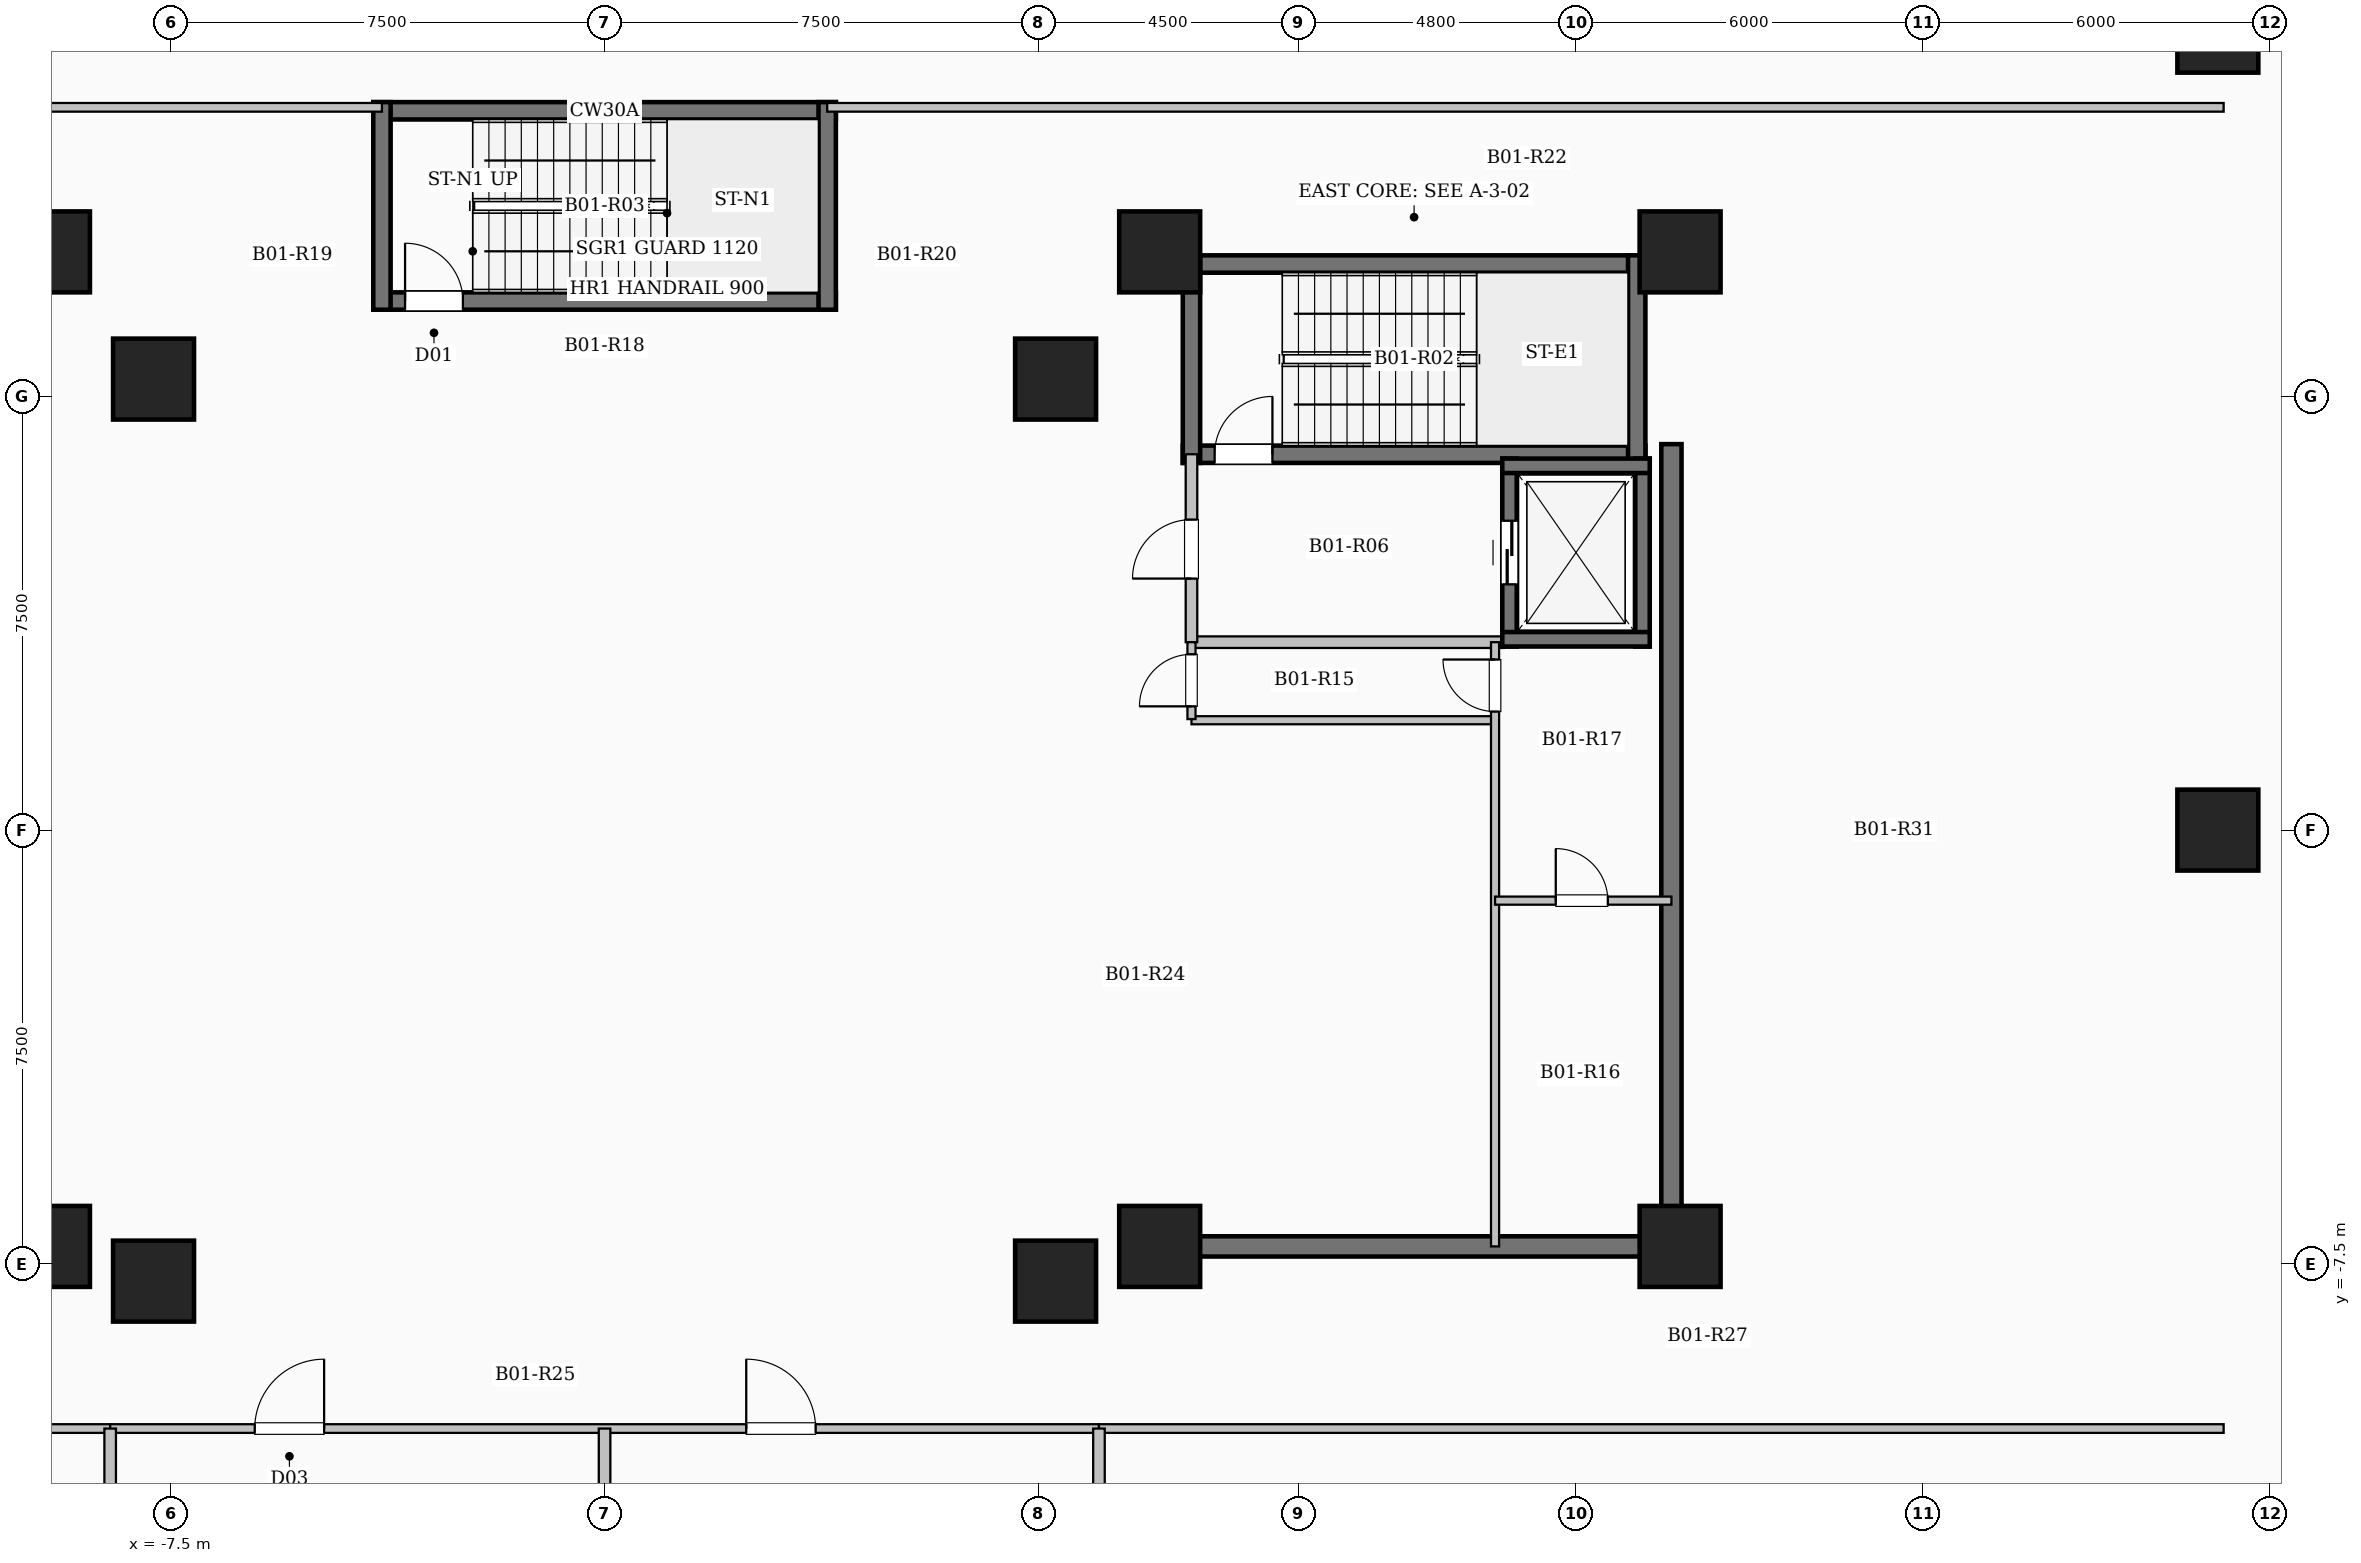
"""IFC4 building model, lengths in metres.
Left out: names, types, materials, properties, quantities, classifications, styles, units other than length and angle.
Written with IfcOpenShell. Run it as: python <this file> out.ifc"""

import sys

from ifc_helpers import new_model, si_unit, direction, frame, frame_2d, origin, origin_2d, place, context, subcontext, project, spatial, rectangle, extrude, element, fill, save


model = new_model("IFC4")
c1 = context("Model", 3, precision=1e-05, world=origin(), true_north=direction((0.0, 1.0)))
c2 = subcontext(c1, "Body", "Model", "MODEL_VIEW")
j1 = project(units=[si_unit("LENGTHUNIT", "METRE"), si_unit("PLANEANGLEUNIT", "RADIAN")], contexts=[c1])
p1 = place(None, origin())
s1 = spatial("IfcSite", under=j1, at=p1, CompositionType="ELEMENT")
p2 = place(p1, origin())
s2 = spatial("IfcBuilding", under=s1, at=p2, CompositionType="ELEMENT")
p3 = place(p2, frame((0.0, 0.0, -4.6)))
s3 = spatial("IfcBuildingStorey", under=s2, at=p3, CompositionType="ELEMENT", Elevation=-4.6)
for number, where, z_axis, x_axis in (
    (1, (-7.8, -7.8, 0.0), (0.0, 0.0, 1.0), (1.0, 0.0, 0.0)),
    (2, (7.8, -7.8, 0.0), (0.0, 0.0, 1.0), (1.0, 0.0, 0.0)),
    (3, (-7.8, 7.8, 0.0), (0.0, 0.0, 1.0), (1.0, 0.0, 0.0)),
    (4, (7.8, 7.8, 0.0), (0.0, 0.0, 1.0), (1.0, 0.0, 0.0)),
    (5, (-9.6, -7.2, 0.0), (0.0, 0.0, 1.0), (1.0, 0.0, 0.0)),
    (6, (-9.6, 10.0, 0.0), (0.0, 0.0, 1.0), (1.0, 0.0, 0.0)),
    (7, (9.6, -7.2, 0.0), (0.0, 0.0, 1.0), (1.0, 0.0, 0.0)),
    (8, (9.6, 10.0, 0.0), (0.0, 0.0, 1.0), (1.0, 0.0, 0.0)),
    (9, (18.6, -7.2, 0.0), (0.0, 0.0, 1.0), (1.0, 0.0, 0.0)),
    (10, (18.6, 10.0, 0.0), (0.0, 0.0, 1.0), (1.0, 0.0, 0.0)),
    (11, (27.9, 0.0, 0.0), (0.0, 0.0, 1.0), (1.0, 0.0, 0.0)),
    (12, (27.9, 13.8, 0.0), (0.0, 0.0, 1.0), (1.0, 0.0, 0.0)),
):
    element("IfcColumn", number, at=place(p3, frame(where, z_axis=z_axis, x_axis=x_axis)), inside=s3, PredefinedType="COLUMN", context=c2, shape_type="SweptSolid", body=[
        extrude(rectangle(XDim=1.4, YDim=1.4, at=origin_2d()), origin(), (0.0, 0.0, 1.0), 4.6),
    ])
p4 = place(p3, frame((10.0, 9.79, 0.0), z_axis=(0.0, 0.0, 1.0), x_axis=(1.0, 0.0, 0.0)))
e13 = element("IfcWall", 13, at=p4, inside=s3, PredefinedType="SHEAR", context=c2, shape_type="SweptSolid", body=[
    extrude(rectangle(XDim=8.0, YDim=0.3, at=frame_2d((4.0, 0.0))), origin(), (0.0, 0.0, 1.0), 4.6),
])
p5 = place(p3, frame((10.0, 6.5, 0.0), z_axis=(0.0, 0.0, 1.0), x_axis=(1.0, 0.0, 0.0)))
e14 = element("IfcWall", 14, at=p5, inside=s3, PredefinedType="SHEAR", context=c2, shape_type="SweptSolid", body=[
    extrude(rectangle(XDim=8.0, YDim=0.3, at=frame_2d((4.0, 0.0))), origin(), (0.0, 0.0, 1.0), 4.6),
])
p6 = place(p5, frame((0.55, 0.0, 0.0)))
e15 = element("IfcOpeningElement", 15, at=p6, cuts=e14, PredefinedType="OPENING", context=c2, shape_type="SweptSolid", body=[
    extrude(rectangle(XDim=1.0, YDim=2.15, at=frame_2d((0.5, 1.075))), frame((0.0, 0.16, 0.0), z_axis=(0.0, -1.0, 0.0), x_axis=(1.0, 0.0, 0.0)), (0.0, 0.0, 1.0), 0.32),
])
for number, where, z_axis, x_axis in (
    (16, (10.15, 6.35, 0.0), (0.0, 0.0, 1.0), (0.0, 1.0, 0.0)),
    (17, (17.85, 6.35, 0.0), (0.0, 0.0, 1.0), (0.0, 1.0, 0.0)),
):
    element("IfcWall", number, at=place(p3, frame(where, z_axis=z_axis, x_axis=x_axis)), inside=s3, PredefinedType="SHEAR", context=c2, shape_type="SweptSolid", body=[
        extrude(rectangle(XDim=3.59, YDim=0.3, at=frame_2d((1.795, 0.0))), origin(), (0.0, 0.0, 1.0), 4.6),
    ])
p7 = place(p3, frame((-4.0, 12.44, 0.0), z_axis=(0.0, 0.0, 1.0), x_axis=(1.0, 0.0, 0.0)))
e18 = element("IfcWall", 18, at=p7, inside=s3, PredefinedType="SHEAR", context=c2, shape_type="SweptSolid", body=[
    extrude(rectangle(XDim=8.0, YDim=0.3, at=frame_2d((4.0, 0.0))), origin(), (0.0, 0.0, 1.0), 4.6),
])
p8 = place(p3, frame((-4.0, 9.15, 0.0), z_axis=(0.0, 0.0, 1.0), x_axis=(1.0, 0.0, 0.0)))
e19 = element("IfcWall", 19, at=p8, inside=s3, PredefinedType="SHEAR", context=c2, shape_type="SweptSolid", body=[
    extrude(rectangle(XDim=8.0, YDim=0.3, at=frame_2d((4.0, 0.0))), origin(), (0.0, 0.0, 1.0), 4.6),
])
p9 = place(p8, frame((0.55, 0.0, 0.0)))
e20 = element("IfcOpeningElement", 20, at=p9, cuts=e19, PredefinedType="OPENING", context=c2, shape_type="SweptSolid", body=[
    extrude(rectangle(XDim=1.0, YDim=2.15, at=frame_2d((0.5, 1.075))), frame((0.0, 0.16, 0.0), z_axis=(0.0, -1.0, 0.0), x_axis=(1.0, 0.0, 0.0)), (0.0, 0.0, 1.0), 0.32),
])
for number, where, z_axis, x_axis in (
    (21, (-3.85, 9.0, 0.0), (0.0, 0.0, 1.0), (0.0, 1.0, 0.0)),
    (22, (3.85, 9.0, 0.0), (0.0, 0.0, 1.0), (0.0, 1.0, 0.0)),
):
    element("IfcWall", number, at=place(p3, frame(where, z_axis=z_axis, x_axis=x_axis)), inside=s3, PredefinedType="SHEAR", context=c2, shape_type="SweptSolid", body=[
        extrude(rectangle(XDim=3.59, YDim=0.3, at=frame_2d((1.795, 0.0))), origin(), (0.0, 0.0, 1.0), 4.6),
    ])
p10 = place(p3, frame((10.15, 3.25, 0.0), z_axis=(0.0, 0.0, 1.0), x_axis=(1.0, 0.0, 0.0)))
e23 = element("IfcWall", 23, at=p10, inside=s3, PredefinedType="SOLIDWALL", context=c2, shape_type="SweptSolid", body=[
    extrude(rectangle(XDim=5.4, YDim=0.2, at=frame_2d((2.7, 0.0))), origin(), (0.0, 0.0, 1.0), 4.3),
])
p11 = place(p3, frame((10.15, 3.25, 0.0), z_axis=(0.0, 0.0, 1.0), x_axis=(0.0, 1.0, 0.0)))
e24 = element("IfcWall", 24, at=p11, inside=s3, PredefinedType="SOLIDWALL", context=c2, shape_type="SweptSolid", body=[
    extrude(rectangle(XDim=3.25, YDim=0.2, at=frame_2d((1.625, 0.0))), origin(), (0.0, 0.0, 1.0), 4.3),
])
p12 = place(p11, frame((1.1, 0.0, 0.0)))
e25 = element("IfcOpeningElement", 25, at=p12, cuts=e24, PredefinedType="OPENING", context=c2, shape_type="SweptSolid", body=[
    extrude(rectangle(XDim=1.02, YDim=2.15, at=frame_2d((0.51, 1.075))), frame((0.0, 0.11, 0.0), z_axis=(0.0, -1.0, 0.0), x_axis=(1.0, 0.0, 0.0)), (0.0, 0.0, 1.0), 0.22),
])
p13 = place(p3, frame((15.65, 3.175, 0.0), z_axis=(0.0, 0.0, 1.0), x_axis=(0.0, 1.0, 0.0)))
e26 = element("IfcWall", 26, at=p13, inside=s3, PredefinedType="SHEAR", context=c2, shape_type="SweptSolid", body=[
    extrude(rectangle(XDim=3.25, YDim=0.25, at=frame_2d((1.625, 0.0))), origin(), (0.0, 0.0, 1.0), 4.6),
])
p14 = place(p13, frame((1.075, 0.0, 0.0)))
e27 = element("IfcOpeningElement", 27, at=p14, cuts=e26, PredefinedType="OPENING", context=c2, shape_type="SweptSolid", body=[
    extrude(rectangle(XDim=1.1, YDim=2.15, at=frame_2d((0.55, 1.075))), frame((0.0, 0.135, 0.0), z_axis=(0.0, -1.0, 0.0), x_axis=(1.0, 0.0, 0.0)), (0.0, 0.0, 1.0), 0.27),
])
p15 = place(p3, frame((17.95, 3.175, 0.0), z_axis=(0.0, 0.0, 1.0), x_axis=(0.0, 1.0, 0.0)))
e28 = element("IfcWall", 28, at=p15, inside=s3, PredefinedType="SHEAR", context=c2, shape_type="SweptSolid", body=[
    extrude(rectangle(XDim=3.25, YDim=0.25, at=frame_2d((1.625, 0.0))), origin(), (0.0, 0.0, 1.0), 4.6),
])
for number, where, z_axis, x_axis in (
    (29, (15.525, 3.3, 0.0), (0.0, 0.0, 1.0), (1.0, 0.0, 0.0)),
    (30, (15.525, 6.3, 0.0), (0.0, 0.0, 1.0), (1.0, 0.0, 0.0)),
):
    element("IfcWall", number, at=place(p3, frame(where, z_axis=z_axis, x_axis=x_axis)), inside=s3, PredefinedType="SHEAR", context=c2, shape_type="SweptSolid", body=[
        extrude(rectangle(XDim=2.55, YDim=0.25, at=frame_2d((1.275, 0.0))), origin(), (0.0, 0.0, 1.0), 4.6),
    ])
p16 = place(p3, frame((18.45, -7.375, 0.0), z_axis=(0.0, 0.0, 1.0), x_axis=(0.0, 1.0, 0.0)))
e31 = element("IfcWall", 31, at=p16, inside=s3, PredefinedType="SHEAR", context=c2, shape_type="SweptSolid", body=[
    extrude(rectangle(XDim=14.05, YDim=0.35, at=frame_2d((7.025, 0.0))), origin(), (0.0, 0.0, 1.0), 4.6),
])
p17 = place(p3, frame((10.075, -7.2, 0.0), z_axis=(0.0, 0.0, 1.0), x_axis=(1.0, 0.0, 0.0)))
e32 = element("IfcWall", 32, at=p17, inside=s3, PredefinedType="SHEAR", context=c2, shape_type="SweptSolid", body=[
    extrude(rectangle(XDim=8.55, YDim=0.35, at=frame_2d((4.275, 0.0))), origin(), (0.0, 0.0, 1.0), 4.6),
])
p18 = place(p3, frame((10.15, 1.9, 0.0), z_axis=(0.0, 0.0, 1.0), x_axis=(1.0, 0.0, 0.0)))
e33 = element("IfcWall", 33, at=p18, inside=s3, PredefinedType="PARTITIONING", context=c2, shape_type="SweptSolid", body=[
    extrude(rectangle(XDim=5.25, YDim=0.14, at=frame_2d((2.625, 0.0))), origin(), (0.0, 0.0, 1.0), 4.3),
])
p19 = place(p3, frame((10.15, 1.92, 0.0), z_axis=(0.0, 0.0, 1.0), x_axis=(0.0, 1.0, 0.0)))
e34 = element("IfcWall", 34, at=p19, inside=s3, PredefinedType="PARTITIONING", context=c2, shape_type="SweptSolid", body=[
    extrude(rectangle(XDim=1.33, YDim=0.14, at=frame_2d((0.665, 0.0))), origin(), (0.0, 0.0, 1.0), 4.3),
])
p20 = place(p19, frame((0.22, 0.0, 0.0)))
e35 = element("IfcOpeningElement", 35, at=p20, cuts=e34, PredefinedType="OPENING", context=c2, shape_type="SweptSolid", body=[
    extrude(rectangle(XDim=0.9, YDim=2.08, at=frame_2d((0.45, 1.04))), frame((0.0, 0.08, 0.0), z_axis=(0.0, -1.0, 0.0), x_axis=(1.0, 0.0, 0.0)), (0.0, 0.0, 1.0), 0.16),
])
p21 = place(p3, frame((15.4, -7.2, 0.0), z_axis=(0.0, 0.0, 1.0), x_axis=(0.0, 1.0, 0.0)))
e36 = element("IfcWall", 36, at=p21, inside=s3, PredefinedType="PARTITIONING", context=c2, shape_type="SweptSolid", body=[
    extrude(rectangle(XDim=10.45, YDim=0.14, at=frame_2d((5.225, 0.0))), origin(), (0.0, 0.0, 1.0), 4.3),
])
p22 = place(p21, frame((9.25, 0.0, 0.0)))
e37 = element("IfcOpeningElement", 37, at=p22, cuts=e36, PredefinedType="OPENING", context=c2, shape_type="SweptSolid", body=[
    extrude(rectangle(XDim=0.9, YDim=2.08, at=frame_2d((0.45, 1.04))), frame((0.0, 0.08, 0.0), z_axis=(0.0, -1.0, 0.0), x_axis=(1.0, 0.0, 0.0)), (0.0, 0.0, 1.0), 0.16),
])
p23 = place(p3, frame((15.4, -1.22, 0.0), z_axis=(0.0, 0.0, 1.0), x_axis=(1.0, 0.0, 0.0)))
e38 = element("IfcWall", 38, at=p23, inside=s3, PredefinedType="PARTITIONING", context=c2, shape_type="SweptSolid", body=[
    extrude(rectangle(XDim=3.05, YDim=0.14, at=frame_2d((1.525, 0.0))), origin(), (0.0, 0.0, 1.0), 4.3),
])
p24 = place(p23, frame((1.05, 0.0, 0.0)))
e39 = element("IfcOpeningElement", 39, at=p24, cuts=e38, PredefinedType="OPENING", context=c2, shape_type="SweptSolid", body=[
    extrude(rectangle(XDim=0.9, YDim=2.08, at=frame_2d((0.45, 1.04))), frame((0.0, 0.08, 0.0), z_axis=(0.0, -1.0, 0.0), x_axis=(1.0, 0.0, 0.0)), (0.0, 0.0, 1.0), 0.16),
])
for number, where, z_axis, x_axis in (
    (40, (-28.0, 12.5, 0.0), (0.0, 0.0, 1.0), (1.0, 0.0, 0.0)),
    (41, (3.85, 12.5, 0.0), (0.0, 0.0, 1.0), (1.0, 0.0, 0.0)),
):
    element("IfcWall", number, at=place(p3, frame(where, z_axis=z_axis, x_axis=x_axis)), inside=s3, PredefinedType="PARTITIONING", context=c2, shape_type="SweptSolid", body=[
        extrude(rectangle(XDim=24.15, YDim=0.15, at=frame_2d((12.075, 0.0))), origin(), (0.0, 0.0, 1.0), 4.3),
    ])
p25 = place(p3, frame((-28.0, -10.35, 0.0), z_axis=(0.0, 0.0, 1.0), x_axis=(1.0, 0.0, 0.0)))
e42 = element("IfcWall", 42, at=p25, inside=s3, PredefinedType="PARTITIONING", context=c2, shape_type="SweptSolid", body=[
    extrude(rectangle(XDim=19.45, YDim=0.15, at=frame_2d((9.725, 0.0))), origin(), (0.0, 0.0, 1.0), 4.3),
])
p26 = place(p3, frame((-8.55, -10.35, 0.0), z_axis=(0.0, 0.0, 1.0), x_axis=(1.0, 0.0, 0.0)))
e43 = element("IfcWall", 43, at=p26, inside=s3, PredefinedType="PARTITIONING", context=c2, shape_type="SweptSolid", body=[
    extrude(rectangle(XDim=17.1, YDim=0.15, at=frame_2d((8.55, 0.0))), origin(), (0.0, 0.0, 1.0), 4.3),
])
p27 = place(p26, frame((2.5, 0.0, 0.0)))
e44 = element("IfcOpeningElement", 44, at=p27, cuts=e43, PredefinedType="OPENING", context=c2, shape_type="SweptSolid", body=[
    extrude(rectangle(XDim=1.2, YDim=2.2, at=frame_2d((0.6, 1.1))), frame((0.0, 0.085, 0.0), z_axis=(0.0, -1.0, 0.0), x_axis=(1.0, 0.0, 0.0)), (0.0, 0.0, 1.0), 0.17),
])
p28 = place(p26, frame((11.0, 0.0, 0.0)))
e45 = element("IfcOpeningElement", 45, at=p28, cuts=e43, PredefinedType="OPENING", context=c2, shape_type="SweptSolid", body=[
    extrude(rectangle(XDim=1.2, YDim=2.2, at=frame_2d((0.6, 1.1))), frame((0.0, 0.085, 0.0), z_axis=(0.0, -1.0, 0.0), x_axis=(1.0, 0.0, 0.0)), (0.0, 0.0, 1.0), 0.17),
])
p29 = place(p3, frame((8.55, -10.35, 0.0), z_axis=(0.0, 0.0, 1.0), x_axis=(1.0, 0.0, 0.0)))
e46 = element("IfcWall", 46, at=p29, inside=s3, PredefinedType="PARTITIONING", context=c2, shape_type="SweptSolid", body=[
    extrude(rectangle(XDim=19.45, YDim=0.15, at=frame_2d((9.725, 0.0))), origin(), (0.0, 0.0, 1.0), 4.3),
])
for number, where, z_axis, x_axis in (
    (47, (-8.55, -15.7, 0.0), (0.0, 0.0, 1.0), (0.0, 1.0, 0.0)),
    (48, (8.55, -15.7, 0.0), (0.0, 0.0, 1.0), (0.0, 1.0, 0.0)),
    (49, (0.0, -15.7, 0.0), (0.0, 0.0, 1.0), (0.0, 1.0, 0.0)),
):
    element("IfcWall", number, at=place(p3, frame(where, z_axis=z_axis, x_axis=x_axis)), inside=s3, PredefinedType="SOLIDWALL", context=c2, shape_type="SweptSolid", body=[
        extrude(rectangle(XDim=5.35, YDim=0.2, at=frame_2d((2.675, 0.0))), origin(), (0.0, 0.0, 1.0), 4.3),
    ])
p30 = place(p6, origin())
e50 = element("IfcDoor", 50, at=p30, inside=s3, OperationType="SINGLE_SWING_RIGHT", PredefinedType="DOOR", context=c2, shape_type="SweptSolid", body=[
    extrude(rectangle(XDim=1.0, YDim=2.15, at=frame_2d((0.5, 1.075))), frame((0.0, 0.025, 0.0), z_axis=(0.0, -1.0, 0.0), x_axis=(1.0, 0.0, 0.0)), (0.0, 0.0, 1.0), 0.05),
])
fill(e15, e50)
p31 = place(p9, origin())
e51 = element("IfcDoor", 51, at=p31, inside=s3, OperationType="SINGLE_SWING_LEFT", PredefinedType="DOOR", context=c2, shape_type="SweptSolid", body=[
    extrude(rectangle(XDim=1.0, YDim=2.15, at=frame_2d((0.5, 1.075))), frame((0.0, 0.025, 0.0), z_axis=(0.0, -1.0, 0.0), x_axis=(1.0, 0.0, 0.0)), (0.0, 0.0, 1.0), 0.05),
])
fill(e20, e51)
p32 = place(p12, origin())
e52 = element("IfcDoor", 52, at=p32, inside=s3, OperationType="SINGLE_SWING_LEFT", PredefinedType="DOOR", context=c2, shape_type="SweptSolid", body=[
    extrude(rectangle(XDim=1.02, YDim=2.15, at=frame_2d((0.51, 1.075))), frame((0.0, 0.025, 0.0), z_axis=(0.0, -1.0, 0.0), x_axis=(1.0, 0.0, 0.0)), (0.0, 0.0, 1.0), 0.05),
])
fill(e25, e52)
p33 = place(p14, origin())
e53 = element("IfcDoor", 53, at=p33, inside=s3, OperationType="SLIDING_TO_LEFT", PredefinedType="DOOR", context=c2, shape_type="SweptSolid", body=[
    extrude(rectangle(XDim=1.1, YDim=2.15, at=frame_2d((0.55, 1.075))), frame((0.0, 0.025, 0.0), z_axis=(0.0, -1.0, 0.0), x_axis=(1.0, 0.0, 0.0)), (0.0, 0.0, 1.0), 0.05),
])
fill(e27, e53)
p34 = place(p20, origin())
e54 = element("IfcDoor", 54, at=p34, inside=s3, OperationType="SINGLE_SWING_LEFT", PredefinedType="DOOR", context=c2, shape_type="SweptSolid", body=[
    extrude(rectangle(XDim=0.9, YDim=2.08, at=frame_2d((0.45, 1.04))), frame((0.0, 0.025, 0.0), z_axis=(0.0, -1.0, 0.0), x_axis=(1.0, 0.0, 0.0)), (0.0, 0.0, 1.0), 0.05),
])
fill(e35, e54)
p35 = place(p22, origin())
e55 = element("IfcDoor", 55, at=p35, inside=s3, OperationType="SINGLE_SWING_RIGHT", PredefinedType="DOOR", context=c2, shape_type="SweptSolid", body=[
    extrude(rectangle(XDim=0.9, YDim=2.08, at=frame_2d((0.45, 1.04))), frame((0.0, 0.025, 0.0), z_axis=(0.0, -1.0, 0.0), x_axis=(1.0, 0.0, 0.0)), (0.0, 0.0, 1.0), 0.05),
])
fill(e37, e55)
p36 = place(p24, origin())
e56 = element("IfcDoor", 56, at=p36, inside=s3, OperationType="SINGLE_SWING_LEFT", PredefinedType="DOOR", context=c2, shape_type="SweptSolid", body=[
    extrude(rectangle(XDim=0.9, YDim=2.08, at=frame_2d((0.45, 1.04))), frame((0.0, 0.025, 0.0), z_axis=(0.0, -1.0, 0.0), x_axis=(1.0, 0.0, 0.0)), (0.0, 0.0, 1.0), 0.05),
])
fill(e39, e56)
p37 = place(p27, origin())
e57 = element("IfcDoor", 57, at=p37, inside=s3, OperationType="SINGLE_SWING_RIGHT", PredefinedType="DOOR", context=c2, shape_type="SweptSolid", body=[
    extrude(rectangle(XDim=1.2, YDim=2.2, at=frame_2d((0.6, 1.1))), frame((0.0, 0.025, 0.0), z_axis=(0.0, -1.0, 0.0), x_axis=(1.0, 0.0, 0.0)), (0.0, 0.0, 1.0), 0.05),
])
fill(e44, e57)
p38 = place(p28, origin())
e58 = element("IfcDoor", 58, at=p38, inside=s3, OperationType="SINGLE_SWING_LEFT", PredefinedType="DOOR", context=c2, shape_type="SweptSolid", body=[
    extrude(rectangle(XDim=1.2, YDim=2.2, at=frame_2d((0.6, 1.1))), frame((0.0, 0.025, 0.0), z_axis=(0.0, -1.0, 0.0), x_axis=(1.0, 0.0, 0.0)), (0.0, 0.0, 1.0), 0.05),
])
fill(e45, e58)
save(model, sys.argv[1])
